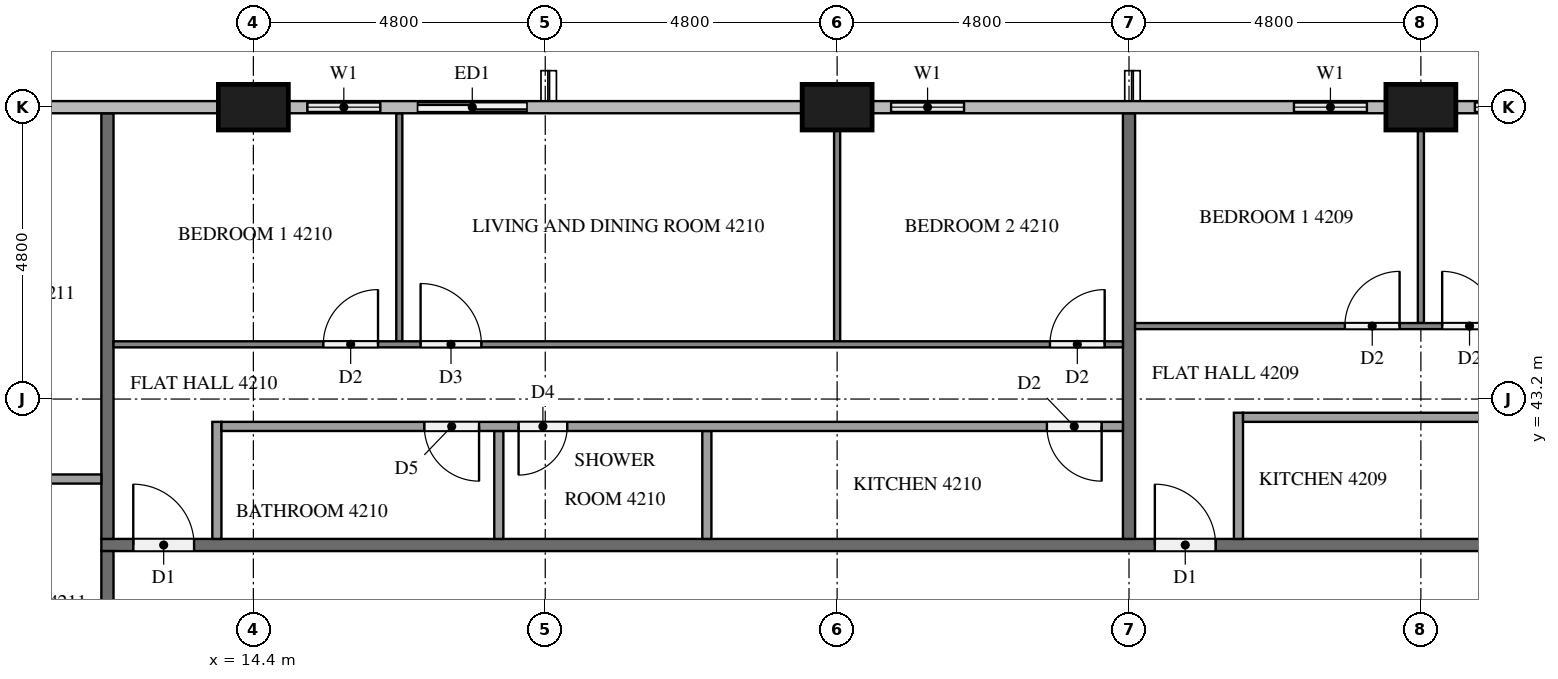
"""IFC4 building model, lengths in metres.
Left out: names, types, materials, properties, quantities, classifications, styles, units other than length and angle.
Written with IfcOpenShell. Run it as: python <this file> out.ifc"""

import sys

from ifc_helpers import new_model, si_unit, direction, frame, frame_2d, origin, origin_2d, place, context, subcontext, project, spatial, rectangle, extrude, element, fill, save


model = new_model("IFC4")
c1 = context("Model", 3, precision=1e-05, world=origin(), true_north=direction((0.0, 1.0)))
c2 = subcontext(c1, "Body", "Model", "MODEL_VIEW")
j1 = project(units=[si_unit("LENGTHUNIT", "METRE"), si_unit("PLANEANGLEUNIT", "RADIAN")], contexts=[c1])
p1 = place(None, origin())
s1 = spatial("IfcSite", under=j1, at=p1, CompositionType="ELEMENT")
p2 = place(p1, origin())
s2 = spatial("IfcBuilding", under=s1, at=p2, CompositionType="ELEMENT")
p3 = place(p2, frame((0.0, 0.0, 163.0)))
s3 = spatial("IfcBuildingStorey", under=s2, at=p3, CompositionType="ELEMENT", Elevation=163.0)
for number, where, z_axis, x_axis in (
    (1, (33.6, 48.0, 0.0), (0.0, 0.0, 1.0), (1.0, 0.0, 0.0)),
    (2, (24.0, 48.0, 0.0), (0.0, 0.0, 1.0), (1.0, 0.0, 0.0)),
    (3, (14.4, 48.0, 0.0), (0.0, 0.0, 1.0), (1.0, 0.0, 0.0)),
):
    element("IfcColumn", number, at=place(p3, frame(where, z_axis=z_axis, x_axis=x_axis)), inside=s3, PredefinedType="COLUMN", context=c2, shape_type="SweptSolid", body=[
        extrude(rectangle(XDim=1.15, YDim=0.75, at=origin_2d()), origin(), (0.0, 0.0, 1.0), 3.2),
    ])
p4 = place(p3, frame((36.0, 48.0, 0.0), z_axis=(0.0, 0.0, 1.0), x_axis=(-1.0, 0.0, 0.0)))
e4 = element("IfcWall", 4, at=p4, inside=s3, PredefinedType="SOLIDWALL", context=c2, shape_type="SweptSolid", body=[
    extrude(rectangle(XDim=1.825, YDim=0.15, at=frame_2d((0.913, 0.0))), origin(), (0.0, 0.0, 1.0), 3.2),
])
p5 = place(p4, frame((0.312, 0.0, 0.9)))
e5 = element("IfcOpeningElement", 5, at=p5, cuts=e4, PredefinedType="OPENING", context=c2, shape_type="SweptSolid", body=[
    extrude(rectangle(XDim=1.2, YDim=1.4, at=frame_2d((0.6, 0.7))), frame((0.0, 0.085, 0.0), z_axis=(0.0, -1.0, 0.0), x_axis=(1.0, 0.0, 0.0)), (0.0, 0.0, 1.0), 0.17),
])
p6 = place(p3, frame((33.025, 48.0, 0.0), z_axis=(0.0, 0.0, 1.0), x_axis=(-1.0, 0.0, 0.0)))
e6 = element("IfcWall", 6, at=p6, inside=s3, PredefinedType="SOLIDWALL", context=c2, shape_type="SweptSolid", body=[
    extrude(rectangle(XDim=1.825, YDim=0.15, at=frame_2d((0.913, 0.0))), origin(), (0.0, 0.0, 1.0), 3.2),
])
p7 = place(p6, frame((0.312, 0.0, 0.9)))
e7 = element("IfcOpeningElement", 7, at=p7, cuts=e6, PredefinedType="OPENING", context=c2, shape_type="SweptSolid", body=[
    extrude(rectangle(XDim=1.2, YDim=1.4, at=frame_2d((0.6, 0.7))), frame((0.0, 0.085, 0.0), z_axis=(0.0, -1.0, 0.0), x_axis=(1.0, 0.0, 0.0)), (0.0, 0.0, 1.0), 0.17),
])
p8 = place(p3, frame((26.4, 48.0, 0.0), z_axis=(0.0, 0.0, 1.0), x_axis=(-1.0, 0.0, 0.0)))
e8 = element("IfcWall", 8, at=p8, inside=s3, PredefinedType="SOLIDWALL", context=c2, shape_type="SweptSolid", body=[
    extrude(rectangle(XDim=1.825, YDim=0.15, at=frame_2d((0.913, 0.0))), origin(), (0.0, 0.0, 1.0), 3.2),
])
p9 = place(p8, frame((0.312, 0.0, 0.9)))
e9 = element("IfcOpeningElement", 9, at=p9, cuts=e8, PredefinedType="OPENING", context=c2, shape_type="SweptSolid", body=[
    extrude(rectangle(XDim=1.2, YDim=1.4, at=frame_2d((0.6, 0.7))), frame((0.0, 0.085, 0.0), z_axis=(0.0, -1.0, 0.0), x_axis=(1.0, 0.0, 0.0)), (0.0, 0.0, 1.0), 0.17),
])
p10 = place(p3, frame((19.2, 48.0, 0.0), z_axis=(0.0, 0.0, 1.0), x_axis=(-1.0, 0.0, 0.0)))
e10 = element("IfcWall", 10, at=p10, inside=s3, PredefinedType="SOLIDWALL", context=c2, shape_type="SweptSolid", body=[
    extrude(rectangle(XDim=4.225, YDim=0.15, at=frame_2d((2.112, 0.0))), origin(), (0.0, 0.0, 1.0), 3.2),
])
p11 = place(p10, frame((0.3, 0.0, 0.0)))
e11 = element("IfcOpeningElement", 11, at=p11, cuts=e10, PredefinedType="OPENING", context=c2, shape_type="SweptSolid", body=[
    extrude(rectangle(XDim=1.8, YDim=2.4, at=frame_2d((0.9, 1.2))), frame((0.0, 0.085, 0.0), z_axis=(0.0, -1.0, 0.0), x_axis=(1.0, 0.0, 0.0)), (0.0, 0.0, 1.0), 0.17),
])
p12 = place(p10, frame((2.712, 0.0, 0.9)))
e12 = element("IfcOpeningElement", 12, at=p12, cuts=e10, PredefinedType="OPENING", context=c2, shape_type="SweptSolid", body=[
    extrude(rectangle(XDim=1.2, YDim=1.4, at=frame_2d((0.6, 0.7))), frame((0.0, 0.085, 0.0), z_axis=(0.0, -1.0, 0.0), x_axis=(1.0, 0.0, 0.0)), (0.0, 0.0, 1.0), 0.17),
])
p13 = place(p3, frame((11.9, 40.8, 0.0), z_axis=(0.0, 0.0, 1.0), x_axis=(1.0, 0.0, 0.0)))
e13 = element("IfcWall", 13, at=p13, inside=s3, PredefinedType="PARTITIONING", context=c2, shape_type="SweptSolid", body=[
    extrude(rectangle(XDim=38.6, YDim=0.2, at=frame_2d((19.3, 0.0))), origin(), (0.0, 0.0, 1.0), 3.2),
])
p14 = place(p13, frame((31.725, 0.0, 0.0)))
e14 = element("IfcOpeningElement", 14, at=p14, cuts=e13, PredefinedType="OPENING", context=c2, shape_type="SweptSolid", body=[
    extrude(rectangle(XDim=1.0, YDim=2.1, at=frame_2d((0.5, 1.05))), frame((0.0, 0.11, 0.0), z_axis=(0.0, -1.0, 0.0), x_axis=(1.0, 0.0, 0.0)), (0.0, 0.0, 1.0), 0.22),
])
p15 = place(p13, frame((17.325, 0.0, 0.0)))
e15 = element("IfcOpeningElement", 15, at=p15, cuts=e13, PredefinedType="OPENING", context=c2, shape_type="SweptSolid", body=[
    extrude(rectangle(XDim=1.0, YDim=2.1, at=frame_2d((0.5, 1.05))), frame((0.0, 0.11, 0.0), z_axis=(0.0, -1.0, 0.0), x_axis=(1.0, 0.0, 0.0)), (0.0, 0.0, 1.0), 0.22),
])
p16 = place(p13, frame((0.525, 0.0, 0.0)))
e16 = element("IfcOpeningElement", 16, at=p16, cuts=e13, PredefinedType="OPENING", context=c2, shape_type="SweptSolid", body=[
    extrude(rectangle(XDim=1.0, YDim=2.1, at=frame_2d((0.5, 1.05))), frame((0.0, 0.11, 0.0), z_axis=(0.0, -1.0, 0.0), x_axis=(1.0, 0.0, 0.0)), (0.0, 0.0, 1.0), 0.22),
])
p17 = place(p3, frame((12.0, 12.1, 0.0), z_axis=(0.0, 0.0, 1.0), x_axis=(0.0, 1.0, 0.0)))
e17 = element("IfcWall", 17, at=p17, inside=s3, PredefinedType="PARTITIONING", context=c2, shape_type="SweptSolid", body=[
    extrude(rectangle(XDim=28.6, YDim=0.2, at=frame_2d((14.3, 0.0))), origin(), (0.0, 0.0, 1.0), 3.2),
])
p18 = place(p17, frame((24.325, 0.0, 0.0)))
e18 = element("IfcOpeningElement", 18, at=p18, cuts=e17, PredefinedType="OPENING", context=c2, shape_type="SweptSolid", body=[
    extrude(rectangle(XDim=1.0, YDim=2.1, at=frame_2d((0.5, 1.05))), frame((0.0, 0.11, 0.0), z_axis=(0.0, -1.0, 0.0), x_axis=(1.0, 0.0, 0.0)), (0.0, 0.0, 1.0), 0.22),
])
p19 = place(p17, frame((22.475, 0.0, 0.0)))
e19 = element("IfcOpeningElement", 19, at=p19, cuts=e17, PredefinedType="OPENING", context=c2, shape_type="SweptSolid", body=[
    extrude(rectangle(XDim=1.0, YDim=2.1, at=frame_2d((0.5, 1.05))), frame((0.0, 0.11, 0.0), z_axis=(0.0, -1.0, 0.0), x_axis=(1.0, 0.0, 0.0)), (0.0, 0.0, 1.0), 0.22),
])
p20 = place(p17, frame((0.325, 0.0, 0.0)))
e20 = element("IfcOpeningElement", 20, at=p20, cuts=e17, PredefinedType="OPENING", context=c2, shape_type="SweptSolid", body=[
    extrude(rectangle(XDim=1.0, YDim=2.1, at=frame_2d((0.5, 1.05))), frame((0.0, 0.11, 0.0), z_axis=(0.0, -1.0, 0.0), x_axis=(1.0, 0.0, 0.0)), (0.0, 0.0, 1.0), 0.22),
])
for number, where, z_axis, x_axis in (
    (21, (28.8, 47.9, 0.0), (0.0, 0.0, 1.0), (0.0, -1.0, 0.0)),
    (22, (12.0, 47.9, 0.0), (0.0, 0.0, 1.0), (0.0, -1.0, 0.0)),
):
    element("IfcWall", number, at=place(p3, frame(where, z_axis=z_axis, x_axis=x_axis)), inside=s3, PredefinedType="PARTITIONING", context=c2, shape_type="SweptSolid", body=[
        extrude(rectangle(XDim=7.0, YDim=0.2, at=frame_2d((3.5, 0.0))), origin(), (0.0, 0.0, 1.0), 3.2),
    ])
p21 = place(p3, frame((33.6, 44.45, 0.0), z_axis=(0.0, 0.0, 1.0), x_axis=(0.0, 1.0, 0.0)))
e23 = element("IfcWall", 23, at=p21, inside=s3, PredefinedType="PARTITIONING", context=c2, shape_type="SweptSolid", body=[
    extrude(rectangle(XDim=3.175, YDim=0.1, at=frame_2d((1.587, 0.0))), origin(), (0.0, 0.0, 1.0), 3.2),
])
p22 = place(p3, frame((28.9, 44.4, 0.0), z_axis=(0.0, 0.0, 1.0), x_axis=(1.0, 0.0, 0.0)))
e24 = element("IfcWall", 24, at=p22, inside=s3, PredefinedType="PARTITIONING", context=c2, shape_type="SweptSolid", body=[
    extrude(rectangle(XDim=14.2, YDim=0.1, at=frame_2d((7.1, 0.0))), origin(), (0.0, 0.0, 1.0), 3.2),
])
p23 = place(p22, frame((3.45, 0.0, 0.0)))
e25 = element("IfcOpeningElement", 25, at=p23, cuts=e24, PredefinedType="OPENING", context=c2, shape_type="SweptSolid", body=[
    extrude(rectangle(XDim=0.9, YDim=2.1, at=frame_2d((0.45, 1.05))), frame((0.0, 0.06, 0.0), z_axis=(0.0, -1.0, 0.0), x_axis=(1.0, 0.0, 0.0)), (0.0, 0.0, 1.0), 0.12),
])
p24 = place(p22, frame((5.05, 0.0, 0.0)))
e26 = element("IfcOpeningElement", 26, at=p24, cuts=e24, PredefinedType="OPENING", context=c2, shape_type="SweptSolid", body=[
    extrude(rectangle(XDim=0.9, YDim=2.1, at=frame_2d((0.45, 1.05))), frame((0.0, 0.06, 0.0), z_axis=(0.0, -1.0, 0.0), x_axis=(1.0, 0.0, 0.0)), (0.0, 0.0, 1.0), 0.12),
])
p25 = place(p22, frame((12.9, 0.0, 0.0)))
e27 = element("IfcOpeningElement", 27, at=p25, cuts=e24, PredefinedType="OPENING", context=c2, shape_type="SweptSolid", body=[
    extrude(rectangle(XDim=1.0, YDim=2.1, at=frame_2d((0.5, 1.05))), frame((0.0, 0.06, 0.0), z_axis=(0.0, -1.0, 0.0), x_axis=(1.0, 0.0, 0.0)), (0.0, 0.0, 1.0), 0.12),
])
p26 = place(p3, frame((30.6, 40.9, 0.0), z_axis=(0.0, 0.0, 1.0), x_axis=(0.0, 1.0, 0.0)))
e28 = element("IfcWall", 28, at=p26, inside=s3, PredefinedType="PARTITIONING", context=c2, shape_type="SweptSolid", body=[
    extrude(rectangle(XDim=2.075, YDim=0.15, at=frame_2d((1.038, 0.0))), origin(), (0.0, 0.0, 1.0), 3.2),
])
p27 = place(p3, frame((43.1, 42.9, 0.0), z_axis=(0.0, 0.0, 1.0), x_axis=(-1.0, 0.0, 0.0)))
e29 = element("IfcWall", 29, at=p27, inside=s3, PredefinedType="PARTITIONING", context=c2, shape_type="SweptSolid", body=[
    extrude(rectangle(XDim=12.425, YDim=0.15, at=frame_2d((6.212, 0.0))), origin(), (0.0, 0.0, 1.0), 3.2),
])
p28 = place(p27, frame((7.015, 0.0, 0.0)))
e30 = element("IfcOpeningElement", 30, at=p28, cuts=e29, PredefinedType="OPENING", context=c2, shape_type="SweptSolid", body=[
    extrude(rectangle(XDim=0.9, YDim=2.1, at=frame_2d((0.45, 1.05))), frame((0.0, 0.085, 0.0), z_axis=(0.0, -1.0, 0.0), x_axis=(1.0, 0.0, 0.0)), (0.0, 0.0, 1.0), 0.17),
])
p29 = place(p27, frame((5.565, 0.0, 0.0)))
e31 = element("IfcOpeningElement", 31, at=p29, cuts=e29, PredefinedType="OPENING", context=c2, shape_type="SweptSolid", body=[
    extrude(rectangle(XDim=0.8, YDim=2.1, at=frame_2d((0.4, 1.05))), frame((0.0, 0.085, 0.0), z_axis=(0.0, -1.0, 0.0), x_axis=(1.0, 0.0, 0.0)), (0.0, 0.0, 1.0), 0.17),
])
p30 = place(p27, frame((0.35, 0.0, 0.0)))
e32 = element("IfcOpeningElement", 32, at=p30, cuts=e29, PredefinedType="OPENING", context=c2, shape_type="SweptSolid", body=[
    extrude(rectangle(XDim=0.9, YDim=2.1, at=frame_2d((0.45, 1.05))), frame((0.0, 0.085, 0.0), z_axis=(0.0, -1.0, 0.0), x_axis=(1.0, 0.0, 0.0)), (0.0, 0.0, 1.0), 0.17),
])
p31 = place(p3, frame((16.8, 44.15, 0.0), z_axis=(0.0, 0.0, 1.0), x_axis=(0.0, 1.0, 0.0)))
e33 = element("IfcWall", 33, at=p31, inside=s3, PredefinedType="PARTITIONING", context=c2, shape_type="SweptSolid", body=[
    extrude(rectangle(XDim=3.75, YDim=0.1, at=frame_2d((1.875, 0.0))), origin(), (0.0, 0.0, 1.0), 3.2),
])
p32 = place(p3, frame((24.0, 44.15, 0.0), z_axis=(0.0, 0.0, 1.0), x_axis=(0.0, 1.0, 0.0)))
e34 = element("IfcWall", 34, at=p32, inside=s3, PredefinedType="PARTITIONING", context=c2, shape_type="SweptSolid", body=[
    extrude(rectangle(XDim=3.475, YDim=0.1, at=frame_2d((1.738, 0.0))), origin(), (0.0, 0.0, 1.0), 3.2),
])
p33 = place(p3, frame((12.1, 44.1, 0.0), z_axis=(0.0, 0.0, 1.0), x_axis=(1.0, 0.0, 0.0)))
e35 = element("IfcWall", 35, at=p33, inside=s3, PredefinedType="PARTITIONING", context=c2, shape_type="SweptSolid", body=[
    extrude(rectangle(XDim=16.6, YDim=0.1, at=frame_2d((8.3, 0.0))), origin(), (0.0, 0.0, 1.0), 3.2),
])
p34 = place(p33, frame((3.45, 0.0, 0.0)))
e36 = element("IfcOpeningElement", 36, at=p34, cuts=e35, PredefinedType="OPENING", context=c2, shape_type="SweptSolid", body=[
    extrude(rectangle(XDim=0.9, YDim=2.1, at=frame_2d((0.45, 1.05))), frame((0.0, 0.06, 0.0), z_axis=(0.0, -1.0, 0.0), x_axis=(1.0, 0.0, 0.0)), (0.0, 0.0, 1.0), 0.12),
])
p35 = place(p33, frame((5.05, 0.0, 0.0)))
e37 = element("IfcOpeningElement", 37, at=p35, cuts=e35, PredefinedType="OPENING", context=c2, shape_type="SweptSolid", body=[
    extrude(rectangle(XDim=1.0, YDim=2.1, at=frame_2d((0.5, 1.05))), frame((0.0, 0.06, 0.0), z_axis=(0.0, -1.0, 0.0), x_axis=(1.0, 0.0, 0.0)), (0.0, 0.0, 1.0), 0.12),
])
p36 = place(p33, frame((15.4, 0.0, 0.0)))
e38 = element("IfcOpeningElement", 38, at=p36, cuts=e35, PredefinedType="OPENING", context=c2, shape_type="SweptSolid", body=[
    extrude(rectangle(XDim=0.9, YDim=2.1, at=frame_2d((0.45, 1.05))), frame((0.0, 0.06, 0.0), z_axis=(0.0, -1.0, 0.0), x_axis=(1.0, 0.0, 0.0)), (0.0, 0.0, 1.0), 0.12),
])
for number, where, z_axis, x_axis in (
    (39, (18.437, 40.9, 0.0), (0.0, 0.0, 1.0), (0.0, 1.0, 0.0)),
    (40, (21.858, 40.9, 0.0), (0.0, 0.0, 1.0), (0.0, 1.0, 0.0)),
):
    element("IfcWall", number, at=place(p3, frame(where, z_axis=z_axis, x_axis=x_axis)), inside=s3, PredefinedType="PARTITIONING", context=c2, shape_type="SweptSolid", body=[
        extrude(rectangle(XDim=1.775, YDim=0.15, at=frame_2d((0.888, 0.0))), origin(), (0.0, 0.0, 1.0), 3.2),
    ])
p37 = place(p3, frame((13.8, 40.9, 0.0), z_axis=(0.0, 0.0, 1.0), x_axis=(0.0, 1.0, 0.0)))
e41 = element("IfcWall", 41, at=p37, inside=s3, PredefinedType="PARTITIONING", context=c2, shape_type="SweptSolid", body=[
    extrude(rectangle(XDim=1.925, YDim=0.15, at=frame_2d((0.962, 0.0))), origin(), (0.0, 0.0, 1.0), 3.2),
])
p38 = place(p3, frame((28.7, 42.75, 0.0), z_axis=(0.0, 0.0, 1.0), x_axis=(-1.0, 0.0, 0.0)))
e42 = element("IfcWall", 42, at=p38, inside=s3, PredefinedType="PARTITIONING", context=c2, shape_type="SweptSolid", body=[
    extrude(rectangle(XDim=14.825, YDim=0.15, at=frame_2d((7.413, 0.0))), origin(), (0.0, 0.0, 1.0), 3.2),
])
p39 = place(p38, frame((10.588, 0.0, 0.0)))
e43 = element("IfcOpeningElement", 43, at=p39, cuts=e42, PredefinedType="OPENING", context=c2, shape_type="SweptSolid", body=[
    extrude(rectangle(XDim=0.9, YDim=2.1, at=frame_2d((0.45, 1.05))), frame((0.0, 0.085, 0.0), z_axis=(0.0, -1.0, 0.0), x_axis=(1.0, 0.0, 0.0)), (0.0, 0.0, 1.0), 0.17),
])
p40 = place(p38, frame((9.138, 0.0, 0.0)))
e44 = element("IfcOpeningElement", 44, at=p40, cuts=e42, PredefinedType="OPENING", context=c2, shape_type="SweptSolid", body=[
    extrude(rectangle(XDim=0.8, YDim=2.1, at=frame_2d((0.4, 1.05))), frame((0.0, 0.085, 0.0), z_axis=(0.0, -1.0, 0.0), x_axis=(1.0, 0.0, 0.0)), (0.0, 0.0, 1.0), 0.17),
])
p41 = place(p38, frame((0.35, 0.0, 0.0)))
e45 = element("IfcOpeningElement", 45, at=p41, cuts=e42, PredefinedType="OPENING", context=c2, shape_type="SweptSolid", body=[
    extrude(rectangle(XDim=0.9, YDim=2.1, at=frame_2d((0.45, 1.05))), frame((0.0, 0.085, 0.0), z_axis=(0.0, -1.0, 0.0), x_axis=(1.0, 0.0, 0.0)), (0.0, 0.0, 1.0), 0.17),
])
p42 = place(p3, frame((11.9, 41.885, 0.0), z_axis=(0.0, 0.0, 1.0), x_axis=(-1.0, 0.0, 0.0)))
e46 = element("IfcWall", 46, at=p42, inside=s3, PredefinedType="PARTITIONING", context=c2, shape_type="SweptSolid", body=[
    extrude(rectangle(XDim=2.975, YDim=0.15, at=frame_2d((1.487, 0.0))), origin(), (0.0, 0.0, 1.0), 3.2),
])
p43 = place(p5, origin())
e47 = element("IfcWindow", 47, at=p43, inside=s3, PartitioningType="SINGLE_PANEL", PredefinedType="WINDOW", context=c2, shape_type="SweptSolid", body=[
    extrude(rectangle(XDim=1.2, YDim=1.4, at=frame_2d((0.6, 0.7))), frame((0.0, 0.03, 0.0), z_axis=(0.0, -1.0, 0.0), x_axis=(1.0, 0.0, 0.0)), (0.0, 0.0, 1.0), 0.06),
])
fill(e5, e47)
p44 = place(p7, origin())
e48 = element("IfcWindow", 48, at=p44, inside=s3, PartitioningType="SINGLE_PANEL", PredefinedType="WINDOW", context=c2, shape_type="SweptSolid", body=[
    extrude(rectangle(XDim=1.2, YDim=1.4, at=frame_2d((0.6, 0.7))), frame((0.0, 0.03, 0.0), z_axis=(0.0, -1.0, 0.0), x_axis=(1.0, 0.0, 0.0)), (0.0, 0.0, 1.0), 0.06),
])
fill(e7, e48)
p45 = place(p9, origin())
e49 = element("IfcWindow", 49, at=p45, inside=s3, PartitioningType="SINGLE_PANEL", PredefinedType="WINDOW", context=c2, shape_type="SweptSolid", body=[
    extrude(rectangle(XDim=1.2, YDim=1.4, at=frame_2d((0.6, 0.7))), frame((0.0, 0.03, 0.0), z_axis=(0.0, -1.0, 0.0), x_axis=(1.0, 0.0, 0.0)), (0.0, 0.0, 1.0), 0.06),
])
fill(e9, e49)
p46 = place(p11, origin())
e50 = element("IfcDoor", 50, at=p46, inside=s3, OperationType="SLIDING_TO_RIGHT", PredefinedType="DOOR", context=c2, shape_type="SweptSolid", body=[
    extrude(rectangle(XDim=1.8, YDim=2.4, at=frame_2d((0.9, 1.2))), frame((0.0, 0.025, 0.0), z_axis=(0.0, -1.0, 0.0), x_axis=(1.0, 0.0, 0.0)), (0.0, 0.0, 1.0), 0.05),
])
fill(e11, e50)
p47 = place(p12, origin())
e51 = element("IfcWindow", 51, at=p47, inside=s3, PartitioningType="SINGLE_PANEL", PredefinedType="WINDOW", context=c2, shape_type="SweptSolid", body=[
    extrude(rectangle(XDim=1.2, YDim=1.4, at=frame_2d((0.6, 0.7))), frame((0.0, 0.03, 0.0), z_axis=(0.0, -1.0, 0.0), x_axis=(1.0, 0.0, 0.0)), (0.0, 0.0, 1.0), 0.06),
])
fill(e12, e51)
p48 = place(p15, origin())
e52 = element("IfcDoor", 52, at=p48, inside=s3, OperationType="SINGLE_SWING_LEFT", PredefinedType="DOOR", context=c2, shape_type="SweptSolid", body=[
    extrude(rectangle(XDim=1.0, YDim=2.1, at=frame_2d((0.5, 1.05))), frame((0.0, 0.025, 0.0), z_axis=(0.0, -1.0, 0.0), x_axis=(1.0, 0.0, 0.0)), (0.0, 0.0, 1.0), 0.05),
])
fill(e15, e52)
p49 = place(p16, origin())
e53 = element("IfcDoor", 53, at=p49, inside=s3, OperationType="SINGLE_SWING_LEFT", PredefinedType="DOOR", context=c2, shape_type="SweptSolid", body=[
    extrude(rectangle(XDim=1.0, YDim=2.1, at=frame_2d((0.5, 1.05))), frame((0.0, 0.025, 0.0), z_axis=(0.0, -1.0, 0.0), x_axis=(1.0, 0.0, 0.0)), (0.0, 0.0, 1.0), 0.05),
])
fill(e16, e53)
p50 = place(p23, origin())
e54 = element("IfcDoor", 54, at=p50, inside=s3, OperationType="SINGLE_SWING_RIGHT", PredefinedType="DOOR", context=c2, shape_type="SweptSolid", body=[
    extrude(rectangle(XDim=0.9, YDim=2.1, at=frame_2d((0.45, 1.05))), frame((0.0, 0.025, 0.0), z_axis=(0.0, -1.0, 0.0), x_axis=(1.0, 0.0, 0.0)), (0.0, 0.0, 1.0), 0.05),
])
fill(e25, e54)
p51 = place(p24, origin())
e55 = element("IfcDoor", 55, at=p51, inside=s3, OperationType="SINGLE_SWING_LEFT", PredefinedType="DOOR", context=c2, shape_type="SweptSolid", body=[
    extrude(rectangle(XDim=0.9, YDim=2.1, at=frame_2d((0.45, 1.05))), frame((0.0, 0.025, 0.0), z_axis=(0.0, -1.0, 0.0), x_axis=(1.0, 0.0, 0.0)), (0.0, 0.0, 1.0), 0.05),
])
fill(e26, e55)
p52 = place(p34, origin())
e56 = element("IfcDoor", 56, at=p52, inside=s3, OperationType="SINGLE_SWING_RIGHT", PredefinedType="DOOR", context=c2, shape_type="SweptSolid", body=[
    extrude(rectangle(XDim=0.9, YDim=2.1, at=frame_2d((0.45, 1.05))), frame((0.0, 0.025, 0.0), z_axis=(0.0, -1.0, 0.0), x_axis=(1.0, 0.0, 0.0)), (0.0, 0.0, 1.0), 0.05),
])
fill(e36, e56)
p53 = place(p35, origin())
e57 = element("IfcDoor", 57, at=p53, inside=s3, OperationType="SINGLE_SWING_LEFT", PredefinedType="DOOR", context=c2, shape_type="SweptSolid", body=[
    extrude(rectangle(XDim=1.0, YDim=2.1, at=frame_2d((0.5, 1.05))), frame((0.0, 0.025, 0.0), z_axis=(0.0, -1.0, 0.0), x_axis=(1.0, 0.0, 0.0)), (0.0, 0.0, 1.0), 0.05),
])
fill(e37, e57)
p54 = place(p36, origin())
e58 = element("IfcDoor", 58, at=p54, inside=s3, OperationType="SINGLE_SWING_RIGHT", PredefinedType="DOOR", context=c2, shape_type="SweptSolid", body=[
    extrude(rectangle(XDim=0.9, YDim=2.1, at=frame_2d((0.45, 1.05))), frame((0.0, 0.025, 0.0), z_axis=(0.0, -1.0, 0.0), x_axis=(1.0, 0.0, 0.0)), (0.0, 0.0, 1.0), 0.05),
])
fill(e38, e58)
p55 = place(p39, origin())
e59 = element("IfcDoor", 59, at=p55, inside=s3, OperationType="SINGLE_SWING_LEFT", PredefinedType="DOOR", context=c2, shape_type="SweptSolid", body=[
    extrude(rectangle(XDim=0.9, YDim=2.1, at=frame_2d((0.45, 1.05))), frame((0.0, 0.025, 0.0), z_axis=(0.0, -1.0, 0.0), x_axis=(1.0, 0.0, 0.0)), (0.0, 0.0, 1.0), 0.05),
])
fill(e43, e59)
p56 = place(p40, origin())
e60 = element("IfcDoor", 60, at=p56, inside=s3, OperationType="SINGLE_SWING_RIGHT", PredefinedType="DOOR", context=c2, shape_type="SweptSolid", body=[
    extrude(rectangle(XDim=0.8, YDim=2.1, at=frame_2d((0.4, 1.05))), frame((0.0, 0.025, 0.0), z_axis=(0.0, -1.0, 0.0), x_axis=(1.0, 0.0, 0.0)), (0.0, 0.0, 1.0), 0.05),
])
fill(e44, e60)
p57 = place(p41, origin())
e61 = element("IfcDoor", 61, at=p57, inside=s3, OperationType="SINGLE_SWING_LEFT", PredefinedType="DOOR", context=c2, shape_type="SweptSolid", body=[
    extrude(rectangle(XDim=0.9, YDim=2.1, at=frame_2d((0.45, 1.05))), frame((0.0, 0.025, 0.0), z_axis=(0.0, -1.0, 0.0), x_axis=(1.0, 0.0, 0.0)), (0.0, 0.0, 1.0), 0.05),
])
fill(e45, e61)
save(model, sys.argv[1])
